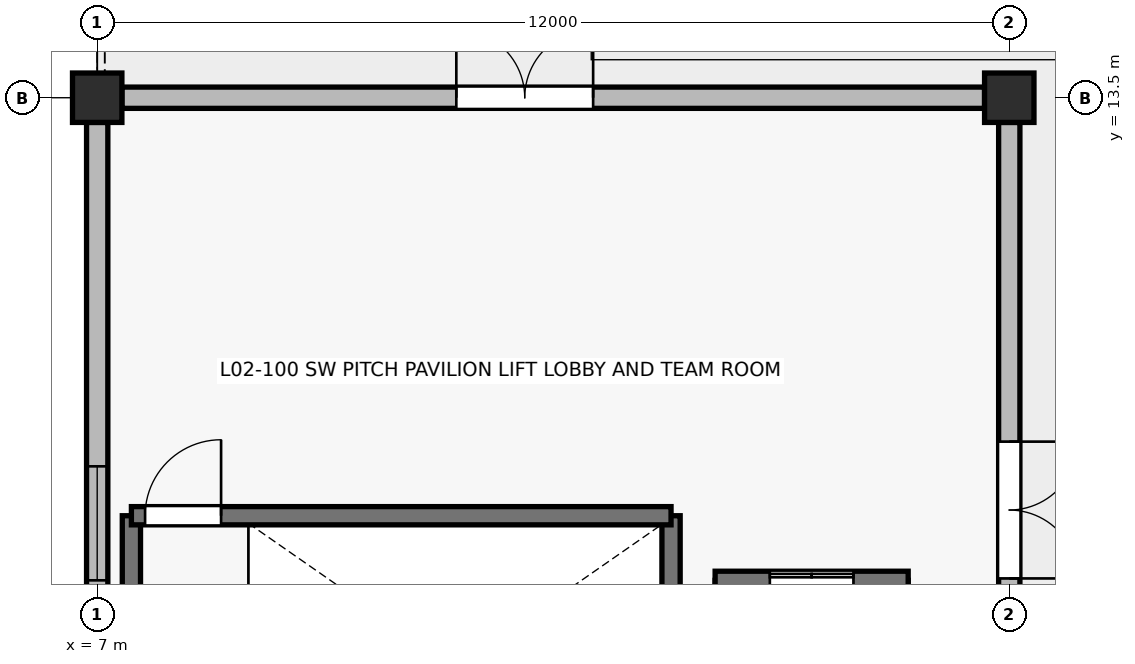
"""IFC4 building model, lengths in metres.
Left out: names, types, materials, properties, quantities, classifications, styles, units other than length and angle.
Written with IfcOpenShell. Run it as: python <this file> out.ifc"""

import sys

from ifc_helpers import new_model, si_unit, direction, frame, frame_2d, origin, origin_2d, place, context, subcontext, project, spatial, rectangle, extrude, element, fill, save


model = new_model("IFC4")
c1 = context("Model", 3, precision=1e-05, world=origin(), true_north=direction((0.0, 1.0)))
c2 = subcontext(c1, "Body", "Model", "MODEL_VIEW")
j1 = project(units=[si_unit("LENGTHUNIT", "METRE"), si_unit("PLANEANGLEUNIT", "RADIAN")], contexts=[c1])
p1 = place(None, origin())
s1 = spatial("IfcSite", under=j1, at=p1, CompositionType="ELEMENT")
p2 = place(p1, origin())
s2 = spatial("IfcBuilding", under=s1, at=p2, CompositionType="ELEMENT")
p3 = place(p2, frame((0.0, 0.0, 9.0)))
s3 = spatial("IfcBuildingStorey", under=s2, at=p3, CompositionType="ELEMENT", Elevation=9.0)
for number, where, z_axis, x_axis in (
    (1, (7.0, 13.5, 0.0), (0.0, 0.0, 1.0), (1.0, 0.0, 0.0)),
    (2, (19.0, 13.5, 0.0), (0.0, 0.0, 1.0), (1.0, 0.0, 0.0)),
):
    element("IfcColumn", number, at=place(p3, frame(where, z_axis=z_axis, x_axis=x_axis)), inside=s3, PredefinedType="COLUMN", context=c2, shape_type="SweptSolid", body=[
        extrude(rectangle(XDim=0.65, YDim=0.65, at=origin_2d()), origin(), (0.0, 0.0, 1.0), 4.2),
    ])
p4 = place(p3, frame((7.0, 3.95, 0.0), z_axis=(0.0, 0.0, 1.0), x_axis=(0.0, 1.0, 0.0)))
e3 = element("IfcWall", 3, at=p4, inside=s3, PredefinedType="SOLIDWALL", context=c2, shape_type="SweptSolid", body=[
    extrude(rectangle(XDim=9.225, YDim=0.28, at=frame_2d((4.613, 0.0))), origin(), (0.0, 0.0, 1.0), 3.1),
])
p5 = place(p4, frame((3.2, 0.0, 0.9)))
e4 = element("IfcOpeningElement", 4, at=p5, cuts=e3, PredefinedType="OPENING", context=c2, shape_type="SweptSolid", body=[
    extrude(rectangle(XDim=1.5, YDim=1.5, at=frame_2d((0.75, 0.75))), frame((0.0, 0.15, 0.0), z_axis=(0.0, -1.0, 0.0), x_axis=(1.0, 0.0, 0.0)), (0.0, 0.0, 1.0), 0.3),
])
p6 = place(p3, frame((7.325, 13.5, 0.0), z_axis=(0.0, 0.0, 1.0), x_axis=(1.0, 0.0, 0.0)))
e5 = element("IfcWall", 5, at=p6, inside=s3, PredefinedType="SOLIDWALL", context=c2, shape_type="SweptSolid", body=[
    extrude(rectangle(XDim=11.35, YDim=0.28, at=frame_2d((5.675, 0.0))), origin(), (0.0, 0.0, 1.0), 3.1),
])
p7 = place(p6, frame((4.4, 0.0, 0.0)))
e6 = element("IfcOpeningElement", 6, at=p7, cuts=e5, PredefinedType="OPENING", context=c2, shape_type="SweptSolid", body=[
    extrude(rectangle(XDim=1.8, YDim=2.25, at=frame_2d((0.9, 1.125))), frame((0.0, 0.15, 0.0), z_axis=(0.0, -1.0, 0.0), x_axis=(1.0, 0.0, 0.0)), (0.0, 0.0, 1.0), 0.3),
])
p8 = place(p3, frame((19.0, 13.175, 0.0), z_axis=(0.0, 0.0, 1.0), x_axis=(0.0, -1.0, 0.0)))
e7 = element("IfcWall", 7, at=p8, inside=s3, PredefinedType="SOLIDWALL", context=c2, shape_type="SweptSolid", body=[
    extrude(rectangle(XDim=9.225, YDim=0.28, at=frame_2d((4.613, 0.0))), origin(), (0.0, 0.0, 1.0), 3.1),
])
p9 = place(p8, frame((4.2, 0.0, 0.0)))
e8 = element("IfcOpeningElement", 8, at=p9, cuts=e7, PredefinedType="OPENING", context=c2, shape_type="SweptSolid", body=[
    extrude(rectangle(XDim=1.8, YDim=2.25, at=frame_2d((0.9, 1.125))), frame((0.0, 0.15, 0.0), z_axis=(0.0, -1.0, 0.0), x_axis=(1.0, 0.0, 0.0)), (0.0, 0.0, 1.0), 0.3),
])
for number, where, z_axis, x_axis in (
    (9, (15.25, 4.45, 0.0), (0.0, 0.0, 1.0), (0.0, 1.0, 0.0)),
    (10, (17.55, 7.15, 0.0), (0.0, 0.0, 1.0), (0.0, -1.0, 0.0)),
):
    element("IfcWall", number, at=place(p3, frame(where, z_axis=z_axis, x_axis=x_axis)), inside=s3, PredefinedType="SHEAR", context=c2, shape_type="SweptSolid", body=[
        extrude(rectangle(XDim=2.7, YDim=0.24, at=frame_2d((1.35, 0.0))), origin(), (0.0, 0.0, 1.0), 3.98),
    ])
p10 = place(p3, frame((15.13, 7.15, 0.0), z_axis=(0.0, 0.0, 1.0), x_axis=(1.0, 0.0, 0.0)))
e11 = element("IfcWall", 11, at=p10, inside=s3, PredefinedType="SHEAR", context=c2, shape_type="SweptSolid", body=[
    extrude(rectangle(XDim=2.54, YDim=0.24, at=frame_2d((1.27, 0.0))), origin(), (0.0, 0.0, 1.0), 3.98),
])
p11 = place(p10, frame((0.72, 0.0, 0.0)))
e12 = element("IfcOpeningElement", 12, at=p11, cuts=e11, PredefinedType="OPENING", context=c2, shape_type="SweptSolid", body=[
    extrude(rectangle(XDim=1.1, YDim=2.15, at=frame_2d((0.55, 1.075))), frame((0.0, 0.13, 0.0), z_axis=(0.0, -1.0, 0.0), x_axis=(1.0, 0.0, 0.0)), (0.0, 0.0, 1.0), 0.26),
])
for number, where, z_axis, x_axis in (
    (13, (7.45, 4.0, 0.0), (0.0, 0.0, 1.0), (0.0, 1.0, 0.0)),
    (14, (14.55, 4.0, 0.0), (0.0, 0.0, 1.0), (0.0, 1.0, 0.0)),
):
    element("IfcWall", number, at=place(p3, frame(where, z_axis=z_axis, x_axis=x_axis)), inside=s3, PredefinedType="SHEAR", context=c2, shape_type="SweptSolid", body=[
        extrude(rectangle(XDim=4.0, YDim=0.24, at=frame_2d((2.0, 0.0))), origin(), (0.0, 0.0, 1.0), 3.98),
    ])
p12 = place(p3, frame((7.45, 8.0, 0.0), z_axis=(0.0, 0.0, 1.0), x_axis=(1.0, 0.0, 0.0)))
e15 = element("IfcWall", 15, at=p12, inside=s3, PredefinedType="SHEAR", context=c2, shape_type="SweptSolid", body=[
    extrude(rectangle(XDim=7.1, YDim=0.24, at=frame_2d((3.55, 0.0))), origin(), (0.0, 0.0, 1.0), 3.98),
])
p13 = place(p12, frame((0.18, 0.0, 0.0)))
e16 = element("IfcOpeningElement", 16, at=p13, cuts=e15, PredefinedType="OPENING", context=c2, shape_type="SweptSolid", body=[
    extrude(rectangle(XDim=1.0, YDim=2.15, at=frame_2d((0.5, 1.075))), frame((0.0, 0.13, 0.0), z_axis=(0.0, -1.0, 0.0), x_axis=(1.0, 0.0, 0.0)), (0.0, 0.0, 1.0), 0.26),
])
p14 = place(p5, origin())
e17 = element("IfcWindow", 17, at=p14, inside=s3, PartitioningType="SINGLE_PANEL", PredefinedType="WINDOW", context=c2, shape_type="SweptSolid", body=[
    extrude(rectangle(XDim=1.5, YDim=1.5, at=frame_2d((0.75, 0.75))), frame((0.0, 0.03, 0.0), z_axis=(0.0, -1.0, 0.0), x_axis=(1.0, 0.0, 0.0)), (0.0, 0.0, 1.0), 0.06),
])
fill(e4, e17)
p15 = place(p7, origin())
e18 = element("IfcDoor", 18, at=p15, inside=s3, OperationType="DOUBLE_DOOR_SINGLE_SWING", PredefinedType="DOOR", context=c2, shape_type="SweptSolid", body=[
    extrude(rectangle(XDim=1.8, YDim=2.25, at=frame_2d((0.9, 1.125))), frame((0.0, 0.025, 0.0), z_axis=(0.0, -1.0, 0.0), x_axis=(1.0, 0.0, 0.0)), (0.0, 0.0, 1.0), 0.05),
])
fill(e6, e18)
p16 = place(p9, origin())
e19 = element("IfcDoor", 19, at=p16, inside=s3, OperationType="DOUBLE_DOOR_SINGLE_SWING", PredefinedType="DOOR", context=c2, shape_type="SweptSolid", body=[
    extrude(rectangle(XDim=1.8, YDim=2.25, at=frame_2d((0.9, 1.125))), frame((0.0, 0.025, 0.0), z_axis=(0.0, -1.0, 0.0), x_axis=(1.0, 0.0, 0.0)), (0.0, 0.0, 1.0), 0.05),
])
fill(e8, e19)
p17 = place(p11, origin())
e20 = element("IfcDoor", 20, at=p17, inside=s3, OperationType="DOUBLE_DOOR_SLIDING", PredefinedType="USERDEFINED", context=c2, shape_type="SweptSolid", body=[
    extrude(rectangle(XDim=1.1, YDim=2.15, at=frame_2d((0.55, 1.075))), frame((0.0, 0.025, 0.0), z_axis=(0.0, -1.0, 0.0), x_axis=(1.0, 0.0, 0.0)), (0.0, 0.0, 1.0), 0.05),
])
fill(e12, e20)
p18 = place(p13, origin())
e21 = element("IfcDoor", 21, at=p18, inside=s3, OperationType="SINGLE_SWING_RIGHT", PredefinedType="DOOR", context=c2, shape_type="SweptSolid", body=[
    extrude(rectangle(XDim=1.0, YDim=2.15, at=frame_2d((0.5, 1.075))), frame((0.0, 0.025, 0.0), z_axis=(0.0, -1.0, 0.0), x_axis=(1.0, 0.0, 0.0)), (0.0, 0.0, 1.0), 0.05),
])
fill(e16, e21)
save(model, sys.argv[1])
